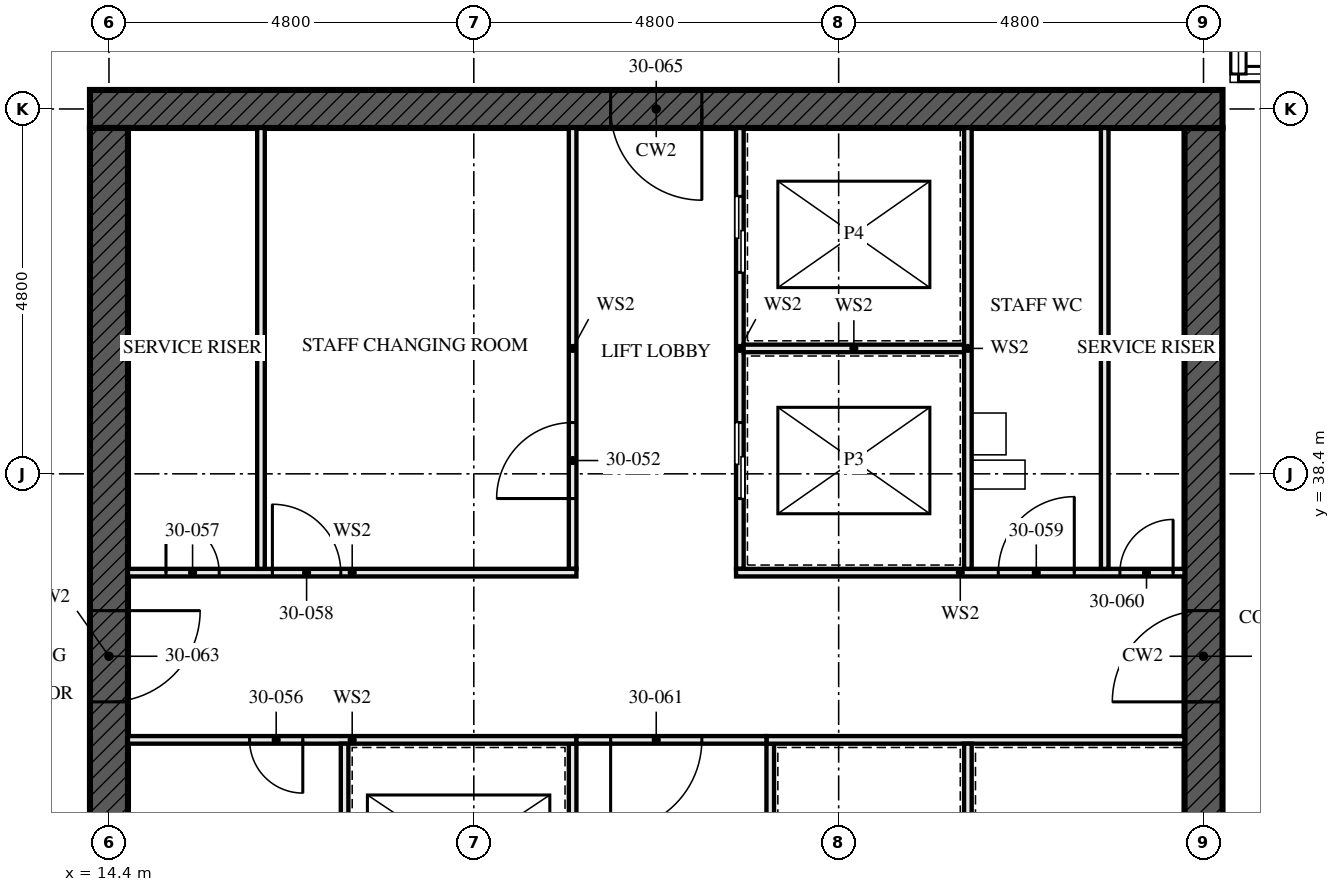
"""IFC4 building model, lengths in metres.
Left out: names, types, materials, properties, quantities, classifications, styles, units other than length and angle.
Written with IfcOpenShell. Run it as: python <this file> out.ifc"""

import sys

from ifc_helpers import new_model, si_unit, direction, frame, frame_2d, origin, place, context, subcontext, project, spatial, rectangle, extrude, element, fill, save


model = new_model("IFC4")
c1 = context("Model", 3, precision=1e-05, world=origin(), true_north=direction((0.0, 1.0)))
c2 = subcontext(c1, "Body", "Model", "MODEL_VIEW")
j1 = project(units=[si_unit("LENGTHUNIT", "METRE"), si_unit("PLANEANGLEUNIT", "RADIAN")], contexts=[c1])
p1 = place(None, origin())
s1 = spatial("IfcSite", under=j1, at=p1, CompositionType="ELEMENT")
p2 = place(p1, origin())
s2 = spatial("IfcBuilding", under=s1, at=p2, CompositionType="ELEMENT")
p3 = place(p2, frame((0.0, 0.0, 112.0)))
s3 = spatial("IfcBuildingStorey", under=s2, at=p3, CompositionType="ELEMENT", Elevation=112.0)
p4 = place(p3, frame((29.05, 43.2, -0.17), z_axis=(0.0, 0.0, 1.0), x_axis=(-1.0, 0.0, 0.0)))
e1 = element("IfcWall", 1, at=p4, inside=s3, PredefinedType="SHEAR", context=c2, shape_type="SweptSolid", body=[
    extrude(rectangle(XDim=14.9, YDim=0.5, at=frame_2d((7.45, 0.0))), origin(), (0.0, 0.0, 1.0), 3.5),
])
p5 = place(p4, frame((6.85, 0.0, 0.17)))
e2 = element("IfcOpeningElement", 2, at=p5, cuts=e1, PredefinedType="OPENING", context=c2, shape_type="SweptSolid", body=[
    extrude(rectangle(XDim=1.2, YDim=2.1, at=frame_2d((0.6, 1.05))), frame((0.0, 0.26, 0.0), z_axis=(0.0, -1.0, 0.0), x_axis=(1.0, 0.0, 0.0)), (0.0, 0.0, 1.0), 0.521),
])
p6 = place(p3, frame((14.4, 42.95, -0.17), z_axis=(0.0, 0.0, 1.0), x_axis=(0.0, -1.0, 0.0)))
e3 = element("IfcWall", 3, at=p6, inside=s3, PredefinedType="SHEAR", context=c2, shape_type="SweptSolid", body=[
    extrude(rectangle(XDim=13.9, YDim=0.5, at=frame_2d((6.95, 0.0))), origin(), (0.0, 0.0, 1.0), 3.5),
])
p7 = place(p6, frame((6.35, 0.0, 0.17)))
e4 = element("IfcOpeningElement", 4, at=p7, cuts=e3, PredefinedType="OPENING", context=c2, shape_type="SweptSolid", body=[
    extrude(rectangle(XDim=1.2, YDim=2.1, at=frame_2d((0.6, 1.05))), frame((0.0, 0.26, 0.0), z_axis=(0.0, -1.0, 0.0), x_axis=(1.0, 0.0, 0.0)), (0.0, 0.0, 1.0), 0.521),
])
p8 = place(p3, frame((28.8, 29.05, -0.17), z_axis=(0.0, 0.0, 1.0), x_axis=(0.0, 1.0, 0.0)))
e5 = element("IfcWall", 5, at=p8, inside=s3, PredefinedType="SHEAR", context=c2, shape_type="SweptSolid", body=[
    extrude(rectangle(XDim=13.9, YDim=0.5, at=frame_2d((6.95, 0.0))), origin(), (0.0, 0.0, 1.0), 3.5),
])
p9 = place(p8, frame((6.35, 0.0, 0.17)))
e6 = element("IfcOpeningElement", 6, at=p9, cuts=e5, PredefinedType="OPENING", context=c2, shape_type="SweptSolid", body=[
    extrude(rectangle(XDim=1.2, YDim=2.1, at=frame_2d((0.6, 1.05))), frame((0.0, 0.26, 0.0), z_axis=(0.0, -1.0, 0.0), x_axis=(1.0, 0.0, 0.0)), (0.0, 0.0, 1.0), 0.521),
])
for number, where, z_axis, x_axis in (
    (7, (16.4, 37.15, 0.0), (0.0, 0.0, 1.0), (0.0, 1.0, 0.0)),
    (8, (27.5, 37.15, 0.0), (0.0, 0.0, 1.0), (0.0, 1.0, 0.0)),
):
    element("IfcWall", number, at=place(p3, frame(where, z_axis=z_axis, x_axis=x_axis)), inside=s3, PredefinedType="SOLIDWALL", context=c2, shape_type="SweptSolid", body=[
        extrude(rectangle(XDim=5.8, YDim=0.1, at=frame_2d((2.9, 0.0))), origin(), (0.0, 0.0, 1.0), 3.33),
    ])
p10 = place(p3, frame((20.5, 29.05, 0.0), z_axis=(0.0, 0.0, 1.0), x_axis=(0.0, 1.0, 0.0)))
e9 = element("IfcWall", 9, at=p10, inside=s3, PredefinedType="SOLIDWALL", context=c2, shape_type="SweptSolid", body=[
    extrude(rectangle(XDim=5.8, YDim=0.1, at=frame_2d((2.9, 0.0))), origin(), (0.0, 0.0, 1.0), 3.33),
])
p11 = place(p10, frame((0.8, 0.0, 0.0)))
e10 = element("IfcOpeningElement", 10, at=p11, cuts=e9, PredefinedType="OPENING", context=c2, shape_type="SweptSolid", body=[
    extrude(rectangle(XDim=1.1, YDim=2.3, at=frame_2d((0.55, 1.15))), frame((0.0, 0.061, 0.0), z_axis=(0.0, -1.0, 0.0), x_axis=(1.0, 0.0, 0.0)), (0.0, 0.0, 1.0), 0.121),
])
p12 = place(p10, frame((3.775, 0.0, 0.0)))
e11 = element("IfcOpeningElement", 11, at=p12, cuts=e9, PredefinedType="OPENING", context=c2, shape_type="SweptSolid", body=[
    extrude(rectangle(XDim=1.1, YDim=2.3, at=frame_2d((0.55, 1.15))), frame((0.0, 0.061, 0.0), z_axis=(0.0, -1.0, 0.0), x_axis=(1.0, 0.0, 0.0)), (0.0, 0.0, 1.0), 0.121),
])
p13 = place(p3, frame((20.5, 37.15, 0.0), z_axis=(0.0, 0.0, 1.0), x_axis=(0.0, 1.0, 0.0)))
e12 = element("IfcWall", 12, at=p13, inside=s3, PredefinedType="SOLIDWALL", context=c2, shape_type="SweptSolid", body=[
    extrude(rectangle(XDim=5.8, YDim=0.1, at=frame_2d((2.9, 0.0))), origin(), (0.0, 0.0, 1.0), 3.33),
])
p14 = place(p13, frame((0.925, 0.0, 0.0)))
e13 = element("IfcOpeningElement", 13, at=p14, cuts=e12, PredefinedType="OPENING", context=c2, shape_type="SweptSolid", body=[
    extrude(rectangle(XDim=1.0, YDim=2.1, at=frame_2d((0.5, 1.05))), frame((0.0, 0.061, 0.0), z_axis=(0.0, -1.0, 0.0), x_axis=(1.0, 0.0, 0.0)), (0.0, 0.0, 1.0), 0.121),
])
p15 = place(p3, frame((22.7, 37.15, 0.0), z_axis=(0.0, 0.0, 1.0), x_axis=(0.0, 1.0, 0.0)))
e14 = element("IfcWall", 14, at=p15, inside=s3, PredefinedType="SOLIDWALL", context=c2, shape_type="SweptSolid", body=[
    extrude(rectangle(XDim=5.8, YDim=0.1, at=frame_2d((2.9, 0.0))), origin(), (0.0, 0.0, 1.0), 3.33),
])
p16 = place(p15, frame((0.925, 0.0, 0.0)))
e15 = element("IfcOpeningElement", 15, at=p16, cuts=e14, PredefinedType="OPENING", context=c2, shape_type="SweptSolid", body=[
    extrude(rectangle(XDim=1.0, YDim=2.1, at=frame_2d((0.5, 1.05))), frame((0.0, 0.061, 0.0), z_axis=(0.0, -1.0, 0.0), x_axis=(1.0, 0.0, 0.0)), (0.0, 0.0, 1.0), 0.121),
])
p17 = place(p15, frame((3.9, 0.0, 0.0)))
e16 = element("IfcOpeningElement", 16, at=p17, cuts=e14, PredefinedType="OPENING", context=c2, shape_type="SweptSolid", body=[
    extrude(rectangle(XDim=1.0, YDim=2.1, at=frame_2d((0.5, 1.05))), frame((0.0, 0.061, 0.0), z_axis=(0.0, -1.0, 0.0), x_axis=(1.0, 0.0, 0.0)), (0.0, 0.0, 1.0), 0.121),
])
p18 = place(p3, frame((23.1, 29.05, 0.0), z_axis=(0.0, 0.0, 1.0), x_axis=(0.0, 1.0, 0.0)))
e17 = element("IfcWall", 17, at=p18, inside=s3, PredefinedType="SOLIDWALL", context=c2, shape_type="SweptSolid", body=[
    extrude(rectangle(XDim=5.8, YDim=0.1, at=frame_2d((2.9, 0.0))), origin(), (0.0, 0.0, 1.0), 3.33),
])
p19 = place(p18, frame((1.0, 0.0, 0.0)))
e18 = element("IfcOpeningElement", 18, at=p19, cuts=e17, PredefinedType="OPENING", context=c2, shape_type="SweptSolid", body=[
    extrude(rectangle(XDim=0.7, YDim=2.1, at=frame_2d((0.35, 1.05))), frame((0.0, 0.061, 0.0), z_axis=(0.0, -1.0, 0.0), x_axis=(1.0, 0.0, 0.0)), (0.0, 0.0, 1.0), 0.121),
])
p20 = place(p3, frame((14.65, 34.9, 0.0), z_axis=(0.0, 0.0, 1.0), x_axis=(1.0, 0.0, 0.0)))
e19 = element("IfcWall", 19, at=p20, inside=s3, PredefinedType="SOLIDWALL", context=c2, shape_type="SweptSolid", body=[
    extrude(rectangle(XDim=5.9, YDim=0.1, at=frame_2d((2.95, 0.0))), origin(), (0.0, 0.0, 1.0), 3.33),
])
p21 = place(p20, frame((1.6, 0.0, 0.0)))
e20 = element("IfcOpeningElement", 20, at=p21, cuts=e19, PredefinedType="OPENING", context=c2, shape_type="SweptSolid", body=[
    extrude(rectangle(XDim=0.7, YDim=2.1, at=frame_2d((0.35, 1.05))), frame((0.0, 0.061, 0.0), z_axis=(0.0, -1.0, 0.0), x_axis=(1.0, 0.0, 0.0)), (0.0, 0.0, 1.0), 0.121),
])
p22 = place(p3, frame((23.05, 34.9, 0.0), z_axis=(0.0, 0.0, 1.0), x_axis=(1.0, 0.0, 0.0)))
e21 = element("IfcWall", 21, at=p22, inside=s3, PredefinedType="SOLIDWALL", context=c2, shape_type="SweptSolid", body=[
    extrude(rectangle(XDim=5.5, YDim=0.1, at=frame_2d((2.75, 0.0))), origin(), (0.0, 0.0, 1.0), 3.33),
])
p23 = place(p3, frame((14.65, 37.1, 0.0), z_axis=(0.0, 0.0, 1.0), x_axis=(1.0, 0.0, 0.0)))
e22 = element("IfcWall", 22, at=p23, inside=s3, PredefinedType="SOLIDWALL", context=c2, shape_type="SweptSolid", body=[
    extrude(rectangle(XDim=5.9, YDim=0.1, at=frame_2d((2.95, 0.0))), origin(), (0.0, 0.0, 1.0), 3.33),
])
p24 = place(p23, frame((0.5, 0.0, 0.0)))
e23 = element("IfcOpeningElement", 23, at=p24, cuts=e22, PredefinedType="OPENING", context=c2, shape_type="SweptSolid", body=[
    extrude(rectangle(XDim=0.7, YDim=2.1, at=frame_2d((0.35, 1.05))), frame((0.0, 0.061, 0.0), z_axis=(0.0, -1.0, 0.0), x_axis=(1.0, 0.0, 0.0)), (0.0, 0.0, 1.0), 0.121),
])
p25 = place(p23, frame((1.9, 0.0, 0.0)))
e24 = element("IfcOpeningElement", 24, at=p25, cuts=e22, PredefinedType="OPENING", context=c2, shape_type="SweptSolid", body=[
    extrude(rectangle(XDim=0.9, YDim=2.1, at=frame_2d((0.45, 1.05))), frame((0.0, 0.061, 0.0), z_axis=(0.0, -1.0, 0.0), x_axis=(1.0, 0.0, 0.0)), (0.0, 0.0, 1.0), 0.121),
])
p26 = place(p3, frame((22.65, 37.1, 0.0), z_axis=(0.0, 0.0, 1.0), x_axis=(1.0, 0.0, 0.0)))
e25 = element("IfcWall", 25, at=p26, inside=s3, PredefinedType="SOLIDWALL", context=c2, shape_type="SweptSolid", body=[
    extrude(rectangle(XDim=5.9, YDim=0.1, at=frame_2d((2.95, 0.0))), origin(), (0.0, 0.0, 1.0), 3.33),
])
p27 = place(p26, frame((3.45, 0.0, 0.0)))
e26 = element("IfcOpeningElement", 26, at=p27, cuts=e25, PredefinedType="OPENING", context=c2, shape_type="SweptSolid", body=[
    extrude(rectangle(XDim=1.0, YDim=2.1, at=frame_2d((0.5, 1.05))), frame((0.0, 0.061, 0.0), z_axis=(0.0, -1.0, 0.0), x_axis=(1.0, 0.0, 0.0)), (0.0, 0.0, 1.0), 0.121),
])
p28 = place(p26, frame((5.05, 0.0, 0.0)))
e27 = element("IfcOpeningElement", 27, at=p28, cuts=e25, PredefinedType="OPENING", context=c2, shape_type="SweptSolid", body=[
    extrude(rectangle(XDim=0.7, YDim=2.1, at=frame_2d((0.35, 1.05))), frame((0.0, 0.061, 0.0), z_axis=(0.0, -1.0, 0.0), x_axis=(1.0, 0.0, 0.0)), (0.0, 0.0, 1.0), 0.121),
])
p29 = place(p3, frame((20.55, 34.9, 0.0), z_axis=(0.0, 0.0, 1.0), x_axis=(1.0, 0.0, 0.0)))
e28 = element("IfcWall", 28, at=p29, inside=s3, PredefinedType="SOLIDWALL", context=c2, shape_type="SweptSolid", body=[
    extrude(rectangle(XDim=2.5, YDim=0.1, at=frame_2d((1.25, 0.0))), origin(), (0.0, 0.0, 1.0), 3.33),
])
p30 = place(p29, frame((0.45, 0.0, 0.0)))
e29 = element("IfcOpeningElement", 29, at=p30, cuts=e28, PredefinedType="OPENING", context=c2, shape_type="SweptSolid", body=[
    extrude(rectangle(XDim=1.2, YDim=2.1, at=frame_2d((0.6, 1.05))), frame((0.0, 0.061, 0.0), z_axis=(0.0, -1.0, 0.0), x_axis=(1.0, 0.0, 0.0)), (0.0, 0.0, 1.0), 0.121),
])
p31 = place(p3, frame((17.5, 29.05, 0.0), z_axis=(0.0, 0.0, 1.0), x_axis=(0.0, 1.0, 0.0)))
e30 = element("IfcWall", 30, at=p31, inside=s3, PredefinedType="SOLIDWALL", context=c2, shape_type="SweptSolid", body=[
    extrude(rectangle(XDim=5.8, YDim=0.1, at=frame_2d((2.9, 0.0))), origin(), (0.0, 0.0, 1.0), 3.33),
])
p32 = place(p3, frame((22.75, 40.05, 0.0), z_axis=(0.0, 0.0, 1.0), x_axis=(1.0, 0.0, 0.0)))
e31 = element("IfcWall", 31, at=p32, inside=s3, PredefinedType="SOLIDWALL", context=c2, shape_type="SweptSolid", body=[
    extrude(rectangle(XDim=2.9, YDim=0.1, at=frame_2d((1.45, 0.0))), origin(), (0.0, 0.0, 1.0), 3.33),
])
p33 = place(p3, frame((25.7, 37.15, 0.0), z_axis=(0.0, 0.0, 1.0), x_axis=(0.0, 1.0, 0.0)))
e32 = element("IfcWall", 32, at=p33, inside=s3, PredefinedType="SOLIDWALL", context=c2, shape_type="SweptSolid", body=[
    extrude(rectangle(XDim=5.8, YDim=0.1, at=frame_2d((2.9, 0.0))), origin(), (0.0, 0.0, 1.0), 3.33),
])
p34 = place(p3, frame((25.7, 31.95, 0.0), z_axis=(0.0, 0.0, 1.0), x_axis=(0.0, 1.0, 0.0)))
e33 = element("IfcWall", 33, at=p34, inside=s3, PredefinedType="SOLIDWALL", context=c2, shape_type="SweptSolid", body=[
    extrude(rectangle(XDim=2.9, YDim=0.1, at=frame_2d((1.45, 0.0))), origin(), (0.0, 0.0, 1.0), 3.33),
])
p35 = place(p14, origin())
e34 = element("IfcDoor", 34, at=p35, inside=s3, OperationType="SINGLE_SWING_RIGHT", PredefinedType="DOOR", context=c2, shape_type="SweptSolid", body=[
    extrude(rectangle(XDim=1.0, YDim=2.1, at=frame_2d((0.5, 1.05))), frame((0.0, 0.027, 0.0), z_axis=(0.0, -1.0, 0.0), x_axis=(1.0, 0.0, 0.0)), (0.0, 0.0, 1.0), 0.054),
])
fill(e13, e34)
p36 = place(p16, origin())
e35 = element("IfcDoor", 35, at=p36, inside=s3, OperationType="SLIDING_TO_LEFT", PredefinedType="DOOR", context=c2, shape_type="SweptSolid", body=[
    extrude(rectangle(XDim=1.0, YDim=2.1, at=frame_2d((0.5, 1.05))), frame((0.0, 0.05, 0.0), z_axis=(0.0, -1.0, 0.0), x_axis=(1.0, 0.0, 0.0)), (0.0, 0.0, 1.0), 0.1),
])
fill(e15, e35)
p37 = place(p17, origin())
e36 = element("IfcDoor", 36, at=p37, inside=s3, OperationType="SLIDING_TO_LEFT", PredefinedType="DOOR", context=c2, shape_type="SweptSolid", body=[
    extrude(rectangle(XDim=1.0, YDim=2.1, at=frame_2d((0.5, 1.05))), frame((0.0, 0.05, 0.0), z_axis=(0.0, -1.0, 0.0), x_axis=(1.0, 0.0, 0.0)), (0.0, 0.0, 1.0), 0.1),
])
fill(e16, e36)
p38 = place(p21, frame((0.7, 0.0, 0.0), z_axis=(0.0, 0.0, 1.0), x_axis=(-1.0, 0.0, 0.0)))
e37 = element("IfcDoor", 37, at=p38, inside=s3, OperationType="SINGLE_SWING_RIGHT", PredefinedType="DOOR", context=c2, shape_type="SweptSolid", body=[
    extrude(rectangle(XDim=0.7, YDim=2.1, at=frame_2d((0.35, 1.05))), frame((0.0, 0.027, 0.0), z_axis=(0.0, -1.0, 0.0), x_axis=(1.0, 0.0, 0.0)), (0.0, 0.0, 1.0), 0.054),
])
fill(e20, e37)
p39 = place(p24, origin())
e38 = element("IfcDoor", 38, at=p39, inside=s3, OperationType="SINGLE_SWING_RIGHT", PredefinedType="DOOR", context=c2, shape_type="SweptSolid", body=[
    extrude(rectangle(XDim=0.7, YDim=2.1, at=frame_2d((0.35, 1.05))), frame((0.0, 0.027, 0.0), z_axis=(0.0, -1.0, 0.0), x_axis=(1.0, 0.0, 0.0)), (0.0, 0.0, 1.0), 0.054),
])
fill(e23, e38)
p40 = place(p25, origin())
e39 = element("IfcDoor", 39, at=p40, inside=s3, OperationType="SINGLE_SWING_RIGHT", PredefinedType="DOOR", context=c2, shape_type="SweptSolid", body=[
    extrude(rectangle(XDim=0.9, YDim=2.1, at=frame_2d((0.45, 1.05))), frame((0.0, 0.027, 0.0), z_axis=(0.0, -1.0, 0.0), x_axis=(1.0, 0.0, 0.0)), (0.0, 0.0, 1.0), 0.054),
])
fill(e24, e39)
p41 = place(p27, origin())
e40 = element("IfcDoor", 40, at=p41, inside=s3, OperationType="SINGLE_SWING_LEFT", PredefinedType="DOOR", context=c2, shape_type="SweptSolid", body=[
    extrude(rectangle(XDim=1.0, YDim=2.1, at=frame_2d((0.5, 1.05))), frame((0.0, 0.027, 0.0), z_axis=(0.0, -1.0, 0.0), x_axis=(1.0, 0.0, 0.0)), (0.0, 0.0, 1.0), 0.054),
])
fill(e26, e40)
p42 = place(p28, origin())
e41 = element("IfcDoor", 41, at=p42, inside=s3, OperationType="SINGLE_SWING_LEFT", PredefinedType="DOOR", context=c2, shape_type="SweptSolid", body=[
    extrude(rectangle(XDim=0.7, YDim=2.1, at=frame_2d((0.35, 1.05))), frame((0.0, 0.027, 0.0), z_axis=(0.0, -1.0, 0.0), x_axis=(1.0, 0.0, 0.0)), (0.0, 0.0, 1.0), 0.054),
])
fill(e27, e41)
p43 = place(p30, frame((1.2, 0.0, 0.0), z_axis=(0.0, 0.0, 1.0), x_axis=(-1.0, 0.0, 0.0)))
e42 = element("IfcDoor", 42, at=p43, inside=s3, OperationType="SINGLE_SWING_LEFT", PredefinedType="DOOR", context=c2, shape_type="SweptSolid", body=[
    extrude(rectangle(XDim=1.2, YDim=2.1, at=frame_2d((0.6, 1.05))), frame((0.0, 0.027, 0.0), z_axis=(0.0, -1.0, 0.0), x_axis=(1.0, 0.0, 0.0)), (0.0, 0.0, 1.0), 0.054),
])
fill(e29, e42)
p44 = place(p7, origin())
e43 = element("IfcDoor", 43, at=p44, inside=s3, OperationType="SINGLE_SWING_LEFT", PredefinedType="DOOR", context=c2, shape_type="SweptSolid", body=[
    extrude(rectangle(XDim=1.2, YDim=2.1, at=frame_2d((0.6, 1.05))), frame((0.0, 0.027, 0.0), z_axis=(0.0, -1.0, 0.0), x_axis=(1.0, 0.0, 0.0)), (0.0, 0.0, 1.0), 0.054),
])
fill(e4, e43)
p45 = place(p9, origin())
e44 = element("IfcDoor", 44, at=p45, inside=s3, OperationType="SINGLE_SWING_LEFT", PredefinedType="DOOR", context=c2, shape_type="SweptSolid", body=[
    extrude(rectangle(XDim=1.2, YDim=2.1, at=frame_2d((0.6, 1.05))), frame((0.0, 0.027, 0.0), z_axis=(0.0, -1.0, 0.0), x_axis=(1.0, 0.0, 0.0)), (0.0, 0.0, 1.0), 0.054),
])
fill(e6, e44)
p46 = place(p5, origin())
e45 = element("IfcDoor", 45, at=p46, inside=s3, OperationType="SINGLE_SWING_LEFT", PredefinedType="DOOR", context=c2, shape_type="SweptSolid", body=[
    extrude(rectangle(XDim=1.2, YDim=2.1, at=frame_2d((0.6, 1.05))), frame((0.0, 0.027, 0.0), z_axis=(0.0, -1.0, 0.0), x_axis=(1.0, 0.0, 0.0)), (0.0, 0.0, 1.0), 0.054),
])
fill(e2, e45)
save(model, sys.argv[1])
